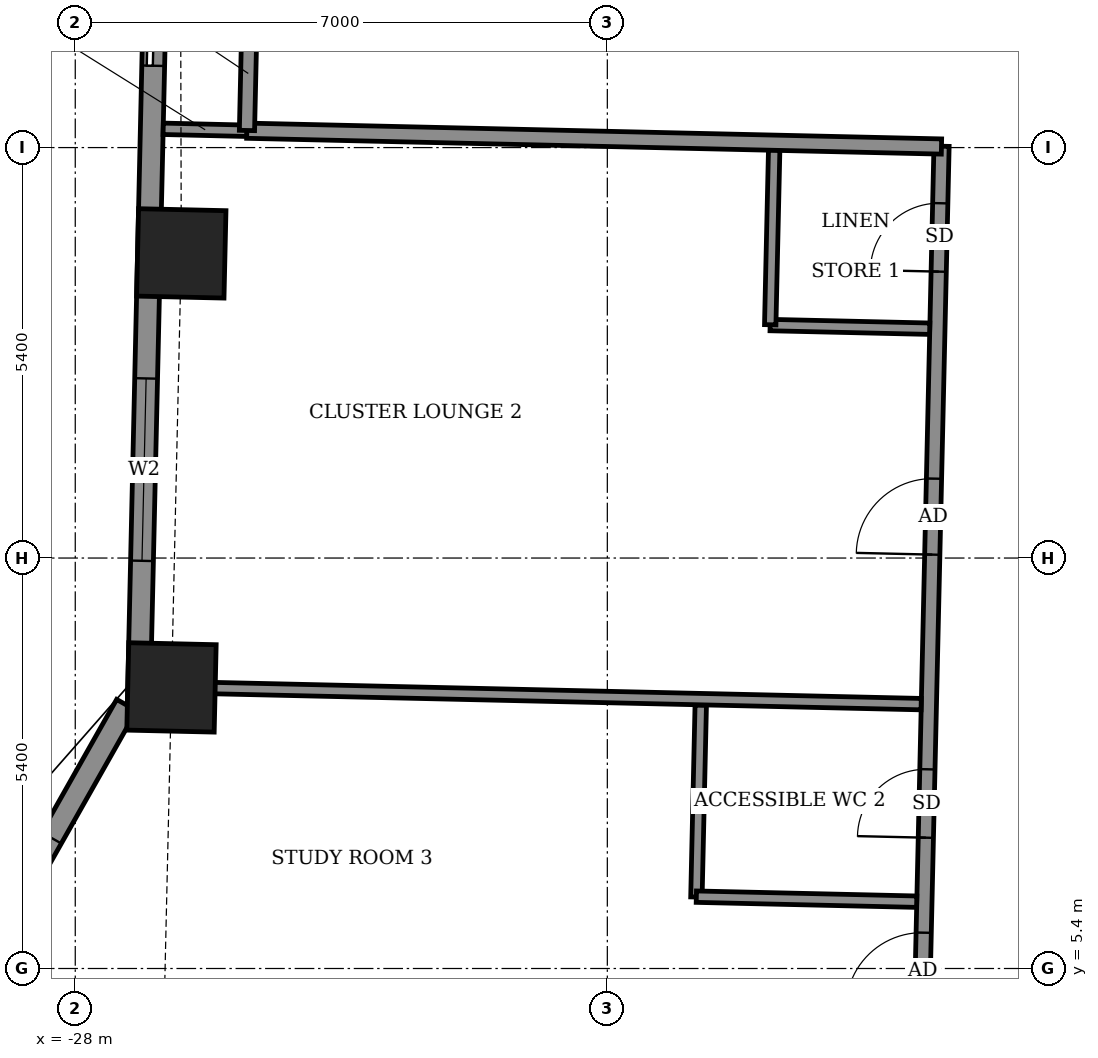
"""IFC4 building model, lengths in metres.
Left out: names, types, materials, properties, quantities, classifications, styles, units other than length and angle.
Written with IfcOpenShell. Run it as: python <this file> out.ifc"""

import sys

from ifc_helpers import new_model, si_unit, direction, frame, frame_2d, origin, origin_2d, place, context, subcontext, project, spatial, rectangle, extrude, element, fill, save


model = new_model("IFC4")
c1 = context("Model", 3, precision=1e-05, world=origin(), true_north=direction((0.0, 1.0)))
c2 = subcontext(c1, "Body", "Model", "MODEL_VIEW")
j1 = project(units=[si_unit("LENGTHUNIT", "METRE"), si_unit("PLANEANGLEUNIT", "RADIAN")], contexts=[c1])
p1 = place(None, origin())
s1 = spatial("IfcSite", under=j1, at=p1, CompositionType="ELEMENT")
p2 = place(p1, origin())
s2 = spatial("IfcBuilding", under=s1, at=p2, CompositionType="ELEMENT")
p3 = place(p2, frame((0.0, 0.0, 205.1)))
s3 = spatial("IfcBuildingStorey", under=s2, at=p3, CompositionType="ELEMENT", Elevation=205.1)
for number, where, z_axis, x_axis in (
    (1, (-26.605, 14.808, -0.55), (0.0, 0.0, 1.0), (-0.023, -1.0, 0.0)),
    (2, (-26.734, 9.098, -0.55), (0.0, 0.0, 1.0), (-0.023, -1.0, 0.0)),
):
    element("IfcColumn", number, at=place(p3, frame(where, z_axis=z_axis, x_axis=x_axis)), inside=s3, PredefinedType="COLUMN", context=c2, shape_type="SweptSolid", body=[
        extrude(rectangle(XDim=1.15, YDim=1.15, at=origin_2d()), origin(), (0.0, 0.0, 1.0), 3.6),
    ])
p4 = place(p3, frame((-26.904, 20.379, 0.0), z_axis=(0.0, 0.0, 1.0), x_axis=(-0.022671687694, -0.999742964255, 0.0)))
e3 = element("IfcWall", 3, at=p4, inside=s3, PredefinedType="SOLIDWALL", context=c2, shape_type="SweptSolid", body=[
    extrude(rectangle(XDim=11.824, YDim=0.3, at=frame_2d((5.912, 0.0))), origin(), (0.0, 0.0, 1.0), 2.55),
])
p5 = place(p4, frame((1.603, 0.0, 0.0)))
e4 = element("IfcOpeningElement", 4, at=p5, cuts=e3, PredefinedType="OPENING", context=c2, shape_type="SweptSolid", body=[
    extrude(rectangle(XDim=1.5, YDim=2.4, at=frame_2d((0.75, 1.2))), frame((0.0, 0.16, 0.0), z_axis=(0.0, -1.0, 0.0), x_axis=(1.0, 0.0, 0.0)), (0.0, 0.0, 1.0), 0.32),
])
p6 = place(p4, frame((7.218, 0.0, 0.9)))
e5 = element("IfcOpeningElement", 5, at=p6, cuts=e3, PredefinedType="OPENING", context=c2, shape_type="SweptSolid", body=[
    extrude(rectangle(XDim=2.4, YDim=1.5, at=frame_2d((1.2, 0.75))), frame((0.0, 0.16, 0.0), z_axis=(0.0, -1.0, 0.0), x_axis=(1.0, 0.0, 0.0)), (0.0, 0.0, 1.0), 0.32),
])
p7 = place(p3, frame((-27.325, 8.866, 0.0), z_axis=(0.0, 0.0, 1.0), x_axis=(-0.492554919955, -0.870281363025, 0.0)))
e6 = element("IfcWall", 6, at=p7, inside=s3, PredefinedType="SOLIDWALL", context=c2, shape_type="SweptSolid", body=[
    extrude(rectangle(XDim=5.398, YDim=0.3, at=frame_2d((2.699, 0.0))), origin(), (0.0, 0.0, 1.0), 3.05),
])
p8 = place(p7, frame((2.008, 0.0, 0.9)))
e7 = element("IfcOpeningElement", 7, at=p8, cuts=e6, PredefinedType="OPENING", context=c2, shape_type="SweptSolid", body=[
    extrude(rectangle(XDim=1.2, YDim=1.5, at=frame_2d((0.6, 0.75))), frame((0.0, 0.16, 0.0), z_axis=(0.0, -1.0, 0.0), x_axis=(1.0, 0.0, 0.0)), (0.0, 0.0, 1.0), 0.32),
])
p9 = place(p3, frame((-17.247, -12.149, 0.0), z_axis=(0.0, 0.0, 1.0), x_axis=(0.022698146637, 0.999742363881, 0.0)))
e8 = element("IfcWall", 8, at=p9, inside=s3, PredefinedType="PARTITIONING", context=c2, shape_type="SweptSolid", body=[
    extrude(rectangle(XDim=28.374, YDim=0.2, at=frame_2d((14.187, 0.0))), origin(), (0.0, 0.0, 1.0), 3.05),
])
p10 = place(p9, frame((23.0, 0.0, 0.0)))
e9 = element("IfcOpeningElement", 9, at=p10, cuts=e8, PredefinedType="OPENING", context=c2, shape_type="SweptSolid", body=[
    extrude(rectangle(XDim=1.0, YDim=2.1, at=frame_2d((0.5, 1.05))), frame((0.0, 0.11, 0.0), z_axis=(0.0, -1.0, 0.0), x_axis=(1.0, 0.0, 0.0)), (0.0, 0.0, 1.0), 0.22),
])
p11 = place(p9, frame((26.724, 0.0, 0.0)))
e10 = element("IfcOpeningElement", 10, at=p11, cuts=e8, PredefinedType="OPENING", context=c2, shape_type="SweptSolid", body=[
    extrude(rectangle(XDim=0.9, YDim=2.1, at=frame_2d((0.45, 1.05))), frame((0.0, 0.11, 0.0), z_axis=(0.0, -1.0, 0.0), x_axis=(1.0, 0.0, 0.0)), (0.0, 0.0, 1.0), 0.22),
])
p12 = place(p9, frame((17.025, 0.0, 0.0)))
e11 = element("IfcOpeningElement", 11, at=p12, cuts=e8, PredefinedType="OPENING", context=c2, shape_type="SweptSolid", body=[
    extrude(rectangle(XDim=1.0, YDim=2.1, at=frame_2d((0.5, 1.05))), frame((0.0, 0.11, 0.0), z_axis=(0.0, -1.0, 0.0), x_axis=(1.0, 0.0, 0.0)), (0.0, 0.0, 1.0), 0.22),
])
p13 = place(p9, frame((19.275, 0.0, 0.0)))
e12 = element("IfcOpeningElement", 12, at=p13, cuts=e8, PredefinedType="OPENING", context=c2, shape_type="SweptSolid", body=[
    extrude(rectangle(XDim=0.9, YDim=2.1, at=frame_2d((0.45, 1.05))), frame((0.0, 0.11, 0.0), z_axis=(0.0, -1.0, 0.0), x_axis=(1.0, 0.0, 0.0)), (0.0, 0.0, 1.0), 0.22),
])
p14 = place(p9, frame((14.95, 0.0, 0.0)))
e13 = element("IfcOpeningElement", 13, at=p14, cuts=e8, PredefinedType="OPENING", context=c2, shape_type="SweptSolid", body=[
    extrude(rectangle(XDim=1.0, YDim=2.1, at=frame_2d((0.5, 1.05))), frame((0.0, 0.11, 0.0), z_axis=(0.0, -1.0, 0.0), x_axis=(1.0, 0.0, 0.0)), (0.0, 0.0, 1.0), 0.22),
])
p15 = place(p9, frame((12.625, 0.0, 0.0)))
e14 = element("IfcOpeningElement", 14, at=p15, cuts=e8, PredefinedType="OPENING", context=c2, shape_type="SweptSolid", body=[
    extrude(rectangle(XDim=0.9, YDim=2.1, at=frame_2d((0.45, 1.05))), frame((0.0, 0.11, 0.0), z_axis=(0.0, -1.0, 0.0), x_axis=(1.0, 0.0, 0.0)), (0.0, 0.0, 1.0), 0.22),
])
p16 = place(p9, frame((10.275, 0.0, 0.0)))
e15 = element("IfcOpeningElement", 15, at=p16, cuts=e8, PredefinedType="OPENING", context=c2, shape_type="SweptSolid", body=[
    extrude(rectangle(XDim=1.0, YDim=2.1, at=frame_2d((0.5, 1.05))), frame((0.0, 0.11, 0.0), z_axis=(0.0, -1.0, 0.0), x_axis=(1.0, 0.0, 0.0)), (0.0, 0.0, 1.0), 0.22),
])
p17 = place(p9, frame((8.025, 0.0, 0.0)))
e16 = element("IfcOpeningElement", 16, at=p17, cuts=e8, PredefinedType="OPENING", context=c2, shape_type="SweptSolid", body=[
    extrude(rectangle(XDim=0.9, YDim=2.1, at=frame_2d((0.45, 1.05))), frame((0.0, 0.11, 0.0), z_axis=(0.0, -1.0, 0.0), x_axis=(1.0, 0.0, 0.0)), (0.0, 0.0, 1.0), 0.22),
])
p18 = place(p9, frame((4.337, 0.0, 0.0)))
e17 = element("IfcOpeningElement", 17, at=p18, cuts=e8, PredefinedType="OPENING", context=c2, shape_type="SweptSolid", body=[
    extrude(rectangle(XDim=1.0, YDim=2.1, at=frame_2d((0.5, 1.05))), frame((0.0, 0.11, 0.0), z_axis=(0.0, -1.0, 0.0), x_axis=(1.0, 0.0, 0.0)), (0.0, 0.0, 1.0), 0.22),
])
p19 = place(p9, frame((0.75, 0.0, 0.0)))
e18 = element("IfcOpeningElement", 18, at=p19, cuts=e8, PredefinedType="OPENING", context=c2, shape_type="SweptSolid", body=[
    extrude(rectangle(XDim=0.9, YDim=2.1, at=frame_2d((0.45, 1.05))), frame((0.0, 0.11, 0.0), z_axis=(0.0, -1.0, 0.0), x_axis=(1.0, 0.0, 0.0)), (0.0, 0.0, 1.0), 0.22),
])
p20 = place(p3, frame((-19.828, 6.34, 0.0), z_axis=(0.0, 0.0, 1.0), x_axis=(0.022532486354, 0.9997461113, 0.0)))
e19 = element("IfcWall", 19, at=p20, inside=s3, PredefinedType="PARTITIONING", context=c2, shape_type="SweptSolid", body=[
    extrude(rectangle(XDim=2.525, YDim=0.15, at=frame_2d((1.262, 0.0))), origin(), (0.0, 0.0, 1.0), 3.05),
])
p21 = place(p3, frame((-19.829, 6.345, 0.0), z_axis=(0.0, 0.0, 1.0), x_axis=(0.999741618182, -0.022730967319, 0.0)))
e20 = element("IfcWall", 20, at=p21, inside=s3, PredefinedType="PARTITIONING", context=c2, shape_type="SweptSolid", body=[
    extrude(rectangle(XDim=2.9, YDim=0.15, at=frame_2d((1.45, 0.0))), origin(), (0.0, 0.0, 1.0), 3.05),
])
p22 = place(p3, frame((-27.01, 9.108, 0.0), z_axis=(0.0, 0.0, 1.0), x_axis=(0.999742841246, -0.022677111331, 0.0)))
e21 = element("IfcWall", 21, at=p22, inside=s3, PredefinedType="PARTITIONING", context=c2, shape_type="SweptSolid", body=[
    extrude(rectangle(XDim=10.142, YDim=0.15, at=frame_2d((5.071, 0.0))), origin(), (0.0, 0.0, 1.0), 3.05),
])
p23 = place(p3, frame((-18.858, 13.865, 0.0), z_axis=(0.0, 0.0, 1.0), x_axis=(0.999737555419, -0.022908956429, 0.0)))
e22 = element("IfcWall", 22, at=p23, inside=s3, PredefinedType="PARTITIONING", context=c2, shape_type="SweptSolid", body=[
    extrude(rectangle(XDim=2.099, YDim=0.15, at=frame_2d((1.05, 0.0))), origin(), (0.0, 0.0, 1.0), 3.05),
])
p24 = place(p3, frame((-18.857, 13.869, 0.0), z_axis=(0.0, 0.0, 1.0), x_axis=(0.022612884682, 0.999744296031, 0.0)))
e23 = element("IfcWall", 23, at=p24, inside=s3, PredefinedType="PARTITIONING", context=c2, shape_type="SweptSolid", body=[
    extrude(rectangle(XDim=2.3, YDim=0.15, at=frame_2d((1.15, 0.0))), origin(), (0.0, 0.0, 1.0), 3.05),
])
p25 = place(p3, frame((-26.843, 16.447, 0.0), z_axis=(0.0, 0.0, 1.0), x_axis=(0.999720170098, -0.023655475055, 0.0)))
e24 = element("IfcWall", 24, at=p25, inside=s3, PredefinedType="PARTITIONING", context=c2, shape_type="SweptSolid", body=[
    extrude(rectangle(XDim=1.104, YDim=0.15, at=frame_2d((0.552, 0.0))), origin(), (0.0, 0.0, 1.0), 2.55),
])
p26 = place(p3, frame((-25.743, 16.422, 0.0), z_axis=(0.0, 0.0, 1.0), x_axis=(0.999741076645, -0.022754772455, 0.0)))
e25 = element("IfcWall", 25, at=p26, inside=s3, PredefinedType="PARTITIONING", context=c2, shape_type="SweptSolid", body=[
    extrude(rectangle(XDim=9.141, YDim=0.2, at=frame_2d((4.571, 0.0))), origin(), (0.0, 0.0, 1.0), 3.05),
])
p27 = place(p3, frame((-25.741, 16.425, 0.0), z_axis=(0.0, 0.0, 1.0), x_axis=(0.022617910375, 0.999744182344, 0.0)))
e26 = element("IfcWall", 26, at=p27, inside=s3, PredefinedType="PARTITIONING", context=c2, shape_type="SweptSolid", body=[
    extrude(rectangle(XDim=1.5, YDim=0.2, at=frame_2d((0.75, 0.0))), origin(), (0.0, 0.0, 1.0), 3.05),
])
p28 = place(p5, origin())
e27 = element("IfcDoor", 27, at=p28, inside=s3, OperationType="SLIDING_TO_LEFT", PredefinedType="DOOR", context=c2, shape_type="SweptSolid", body=[
    extrude(rectangle(XDim=1.5, YDim=2.4, at=frame_2d((0.75, 1.2))), frame((0.0, 0.025, 0.0), z_axis=(0.0, -1.0, 0.0), x_axis=(1.0, 0.0, 0.0)), (0.0, 0.0, 1.0), 0.05),
])
fill(e4, e27)
p29 = place(p6, origin())
e28 = element("IfcWindow", 28, at=p29, inside=s3, PartitioningType="DOUBLE_PANEL_VERTICAL", PredefinedType="WINDOW", context=c2, shape_type="SweptSolid", body=[
    extrude(rectangle(XDim=2.4, YDim=1.5, at=frame_2d((1.2, 0.75))), frame((0.0, 0.03, 0.0), z_axis=(0.0, -1.0, 0.0), x_axis=(1.0, 0.0, 0.0)), (0.0, 0.0, 1.0), 0.06),
])
fill(e5, e28)
p30 = place(p8, origin())
e29 = element("IfcWindow", 29, at=p30, inside=s3, PartitioningType="SINGLE_PANEL", PredefinedType="WINDOW", context=c2, shape_type="SweptSolid", body=[
    extrude(rectangle(XDim=1.2, YDim=1.5, at=frame_2d((0.6, 0.75))), frame((0.0, 0.03, 0.0), z_axis=(0.0, -1.0, 0.0), x_axis=(1.0, 0.0, 0.0)), (0.0, 0.0, 1.0), 0.06),
])
fill(e7, e29)
p31 = place(p10, origin())
e30 = element("IfcDoor", 30, at=p31, inside=s3, OperationType="SINGLE_SWING_LEFT", PredefinedType="DOOR", context=c2, shape_type="SweptSolid", body=[
    extrude(rectangle(XDim=1.0, YDim=2.1, at=frame_2d((0.5, 1.05))), frame((0.0, 0.025, 0.0), z_axis=(0.0, -1.0, 0.0), x_axis=(1.0, 0.0, 0.0)), (0.0, 0.0, 1.0), 0.05),
])
fill(e9, e30)
p32 = place(p11, origin())
e31 = element("IfcDoor", 31, at=p32, inside=s3, OperationType="SINGLE_SWING_RIGHT", PredefinedType="DOOR", context=c2, shape_type="SweptSolid", body=[
    extrude(rectangle(XDim=0.9, YDim=2.1, at=frame_2d((0.45, 1.05))), frame((0.0, 0.025, 0.0), z_axis=(0.0, -1.0, 0.0), x_axis=(1.0, 0.0, 0.0)), (0.0, 0.0, 1.0), 0.05),
])
fill(e10, e31)
p33 = place(p12, origin())
e32 = element("IfcDoor", 32, at=p33, inside=s3, OperationType="SINGLE_SWING_RIGHT", PredefinedType="DOOR", context=c2, shape_type="SweptSolid", body=[
    extrude(rectangle(XDim=1.0, YDim=2.1, at=frame_2d((0.5, 1.05))), frame((0.0, 0.025, 0.0), z_axis=(0.0, -1.0, 0.0), x_axis=(1.0, 0.0, 0.0)), (0.0, 0.0, 1.0), 0.05),
])
fill(e11, e32)
p34 = place(p13, origin())
e33 = element("IfcDoor", 33, at=p34, inside=s3, OperationType="SINGLE_SWING_LEFT", PredefinedType="DOOR", context=c2, shape_type="SweptSolid", body=[
    extrude(rectangle(XDim=0.9, YDim=2.1, at=frame_2d((0.45, 1.05))), frame((0.0, 0.025, 0.0), z_axis=(0.0, -1.0, 0.0), x_axis=(1.0, 0.0, 0.0)), (0.0, 0.0, 1.0), 0.05),
])
fill(e12, e33)
save(model, sys.argv[1])
